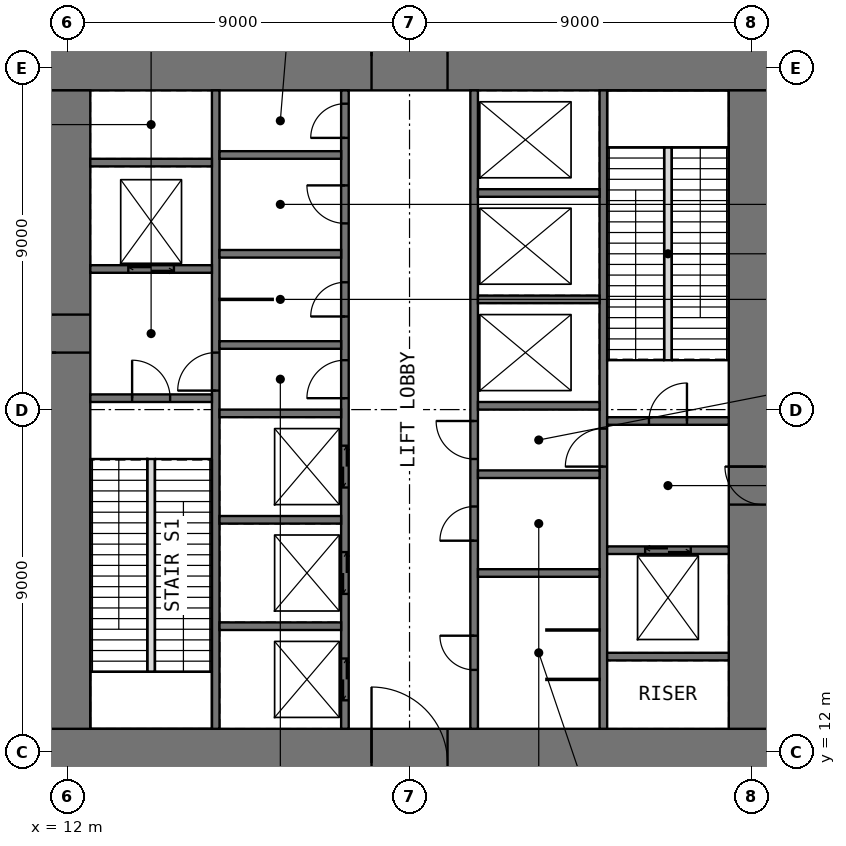
"""IFC4 building model, lengths in metres.
Left out: names, types, materials, properties, quantities, classifications, styles, units other than length and angle.
Written with IfcOpenShell. Run it as: python <this file> out.ifc"""

import sys

from ifc_helpers import new_model, si_unit, direction, frame, frame_2d, origin, place, context, subcontext, project, spatial, rectangle, extrude, element, fill, save


model = new_model("IFC4")
c1 = context("Model", 3, precision=1e-05, world=origin(), true_north=direction((0.0, 1.0)))
c2 = subcontext(c1, "Body", "Model", "MODEL_VIEW")
j1 = project(units=[si_unit("LENGTHUNIT", "METRE"), si_unit("PLANEANGLEUNIT", "RADIAN")], contexts=[c1])
p1 = place(None, origin())
s1 = spatial("IfcSite", under=j1, at=p1, CompositionType="ELEMENT")
p2 = place(p1, origin())
s2 = spatial("IfcBuilding", under=s1, at=p2, CompositionType="ELEMENT")
p3 = place(p2, frame((0.0, 0.0, 11.0)))
s3 = spatial("IfcBuildingStorey", under=s2, at=p3, CompositionType="ELEMENT", Elevation=11.0)
p4 = place(p3, frame((10.8, 11.7, -0.3), z_axis=(0.0, 0.0, 1.0), x_axis=(1.0, 0.0, 0.0)))
e1 = element("IfcWall", 1, at=p4, inside=s3, PredefinedType="SHEAR", context=c2, shape_type="SweptSolid", body=[
    extrude(rectangle(XDim=20.4, YDim=1.8, at=frame_2d((10.2, 0.0))), origin(), (0.0, 0.0, 1.0), 7.1),
])
p5 = place(p4, frame((9.2, 0.0, 0.3)))
e2 = element("IfcOpeningElement", 2, at=p5, cuts=e1, PredefinedType="OPENING", context=c2, shape_type="SweptSolid", body=[
    extrude(rectangle(XDim=2.0, YDim=2.2, at=frame_2d((1.0, 1.1))), frame((0.0, 0.91, 0.0), z_axis=(0.0, -1.0, 0.0), x_axis=(1.0, 0.0, 0.0)), (0.0, 0.0, 1.0), 1.82),
])
p6 = place(p3, frame((10.8, 30.3, -0.3), z_axis=(0.0, 0.0, 1.0), x_axis=(1.0, 0.0, 0.0)))
e3 = element("IfcWall", 3, at=p6, inside=s3, PredefinedType="SHEAR", context=c2, shape_type="SweptSolid", body=[
    extrude(rectangle(XDim=20.4, YDim=1.8, at=frame_2d((10.2, 0.0))), origin(), (0.0, 0.0, 1.0), 7.1),
])
p7 = place(p6, frame((9.2, 0.0, 0.3)))
e4 = element("IfcOpeningElement", 4, at=p7, cuts=e3, PredefinedType="OPENING", context=c2, shape_type="SweptSolid", body=[
    extrude(rectangle(XDim=2.0, YDim=2.2, at=frame_2d((1.0, 1.1))), frame((0.0, 0.91, 0.0), z_axis=(0.0, -1.0, 0.0), x_axis=(1.0, 0.0, 0.0)), (0.0, 0.0, 1.0), 1.82),
])
p8 = place(p3, frame((11.7, 12.6, -0.3), z_axis=(0.0, 0.0, 1.0), x_axis=(0.0, 1.0, 0.0)))
e5 = element("IfcWall", 5, at=p8, inside=s3, PredefinedType="SHEAR", context=c2, shape_type="SweptSolid", body=[
    extrude(rectangle(XDim=16.8, YDim=1.8, at=frame_2d((8.4, 0.0))), origin(), (0.0, 0.0, 1.0), 7.1),
])
p9 = place(p8, frame((9.9, 0.0, 0.3)))
e6 = element("IfcOpeningElement", 6, at=p9, cuts=e5, PredefinedType="OPENING", context=c2, shape_type="SweptSolid", body=[
    extrude(rectangle(XDim=1.0, YDim=2.2, at=frame_2d((0.5, 1.1))), frame((0.0, 0.91, 0.0), z_axis=(0.0, -1.0, 0.0), x_axis=(1.0, 0.0, 0.0)), (0.0, 0.0, 1.0), 1.82),
])
p10 = place(p3, frame((30.3, 12.6, -0.3), z_axis=(0.0, 0.0, 1.0), x_axis=(0.0, 1.0, 0.0)))
e7 = element("IfcWall", 7, at=p10, inside=s3, PredefinedType="SHEAR", context=c2, shape_type="SweptSolid", body=[
    extrude(rectangle(XDim=16.8, YDim=1.8, at=frame_2d((8.4, 0.0))), origin(), (0.0, 0.0, 1.0), 7.1),
])
p11 = place(p10, frame((5.9, 0.0, 0.3)))
e8 = element("IfcOpeningElement", 8, at=p11, cuts=e7, PredefinedType="OPENING", context=c2, shape_type="SweptSolid", body=[
    extrude(rectangle(XDim=1.0, YDim=2.2, at=frame_2d((0.5, 1.1))), frame((0.0, 0.91, 0.0), z_axis=(0.0, -1.0, 0.0), x_axis=(1.0, 0.0, 0.0)), (0.0, 0.0, 1.0), 1.82),
])
p12 = place(p3, frame((15.9, 12.6, -0.3), z_axis=(0.0, 0.0, 1.0), x_axis=(0.0, 1.0, 0.0)))
e9 = element("IfcWall", 9, at=p12, inside=s3, PredefinedType="SHEAR", context=c2, shape_type="SweptSolid", body=[
    extrude(rectangle(XDim=16.8, YDim=0.2, at=frame_2d((8.4, 0.0))), origin(), (0.0, 0.0, 1.0), 7.1),
])
p13 = place(p12, frame((8.9, 0.0, 0.3)))
e10 = element("IfcOpeningElement", 10, at=p13, cuts=e9, PredefinedType="OPENING", context=c2, shape_type="SweptSolid", body=[
    extrude(rectangle(XDim=1.0, YDim=2.2, at=frame_2d((0.5, 1.1))), frame((0.0, 0.11, 0.0), z_axis=(0.0, -1.0, 0.0), x_axis=(1.0, 0.0, 0.0)), (0.0, 0.0, 1.0), 0.22),
])
p14 = place(p3, frame((19.3, 12.6, -0.3), z_axis=(0.0, 0.0, 1.0), x_axis=(0.0, 1.0, 0.0)))
e11 = element("IfcWall", 11, at=p14, inside=s3, PredefinedType="SHEAR", context=c2, shape_type="SweptSolid", body=[
    extrude(rectangle(XDim=16.8, YDim=0.2, at=frame_2d((8.4, 0.0))), origin(), (0.0, 0.0, 1.0), 7.1),
])
p15 = place(p14, frame((8.7, 0.0, 0.3)))
e12 = element("IfcOpeningElement", 12, at=p15, cuts=e11, PredefinedType="OPENING", context=c2, shape_type="SweptSolid", body=[
    extrude(rectangle(XDim=1.0, YDim=2.2, at=frame_2d((0.5, 1.1))), frame((0.0, 0.11, 0.0), z_axis=(0.0, -1.0, 0.0), x_axis=(1.0, 0.0, 0.0)), (0.0, 0.0, 1.0), 0.22),
])
p16 = place(p14, frame((10.85, 0.0, 0.3)))
e13 = element("IfcOpeningElement", 13, at=p16, cuts=e11, PredefinedType="OPENING", context=c2, shape_type="SweptSolid", body=[
    extrude(rectangle(XDim=0.9, YDim=2.2, at=frame_2d((0.45, 1.1))), frame((0.0, 0.11, 0.0), z_axis=(0.0, -1.0, 0.0), x_axis=(1.0, 0.0, 0.0)), (0.0, 0.0, 1.0), 0.22),
])
p17 = place(p14, frame((13.3, 0.0, 0.3)))
e14 = element("IfcOpeningElement", 14, at=p17, cuts=e11, PredefinedType="OPENING", context=c2, shape_type="SweptSolid", body=[
    extrude(rectangle(XDim=1.0, YDim=2.2, at=frame_2d((0.5, 1.1))), frame((0.0, 0.11, 0.0), z_axis=(0.0, -1.0, 0.0), x_axis=(1.0, 0.0, 0.0)), (0.0, 0.0, 1.0), 0.22),
])
p18 = place(p14, frame((15.55, 0.0, 0.3)))
e15 = element("IfcOpeningElement", 15, at=p18, cuts=e11, PredefinedType="OPENING", context=c2, shape_type="SweptSolid", body=[
    extrude(rectangle(XDim=0.9, YDim=2.2, at=frame_2d((0.45, 1.1))), frame((0.0, 0.11, 0.0), z_axis=(0.0, -1.0, 0.0), x_axis=(1.0, 0.0, 0.0)), (0.0, 0.0, 1.0), 0.22),
])
p19 = place(p14, frame((0.75, 0.0, 0.3)))
e16 = element("IfcOpeningElement", 16, at=p19, cuts=e11, PredefinedType="OPENING", context=c2, shape_type="SweptSolid", body=[
    extrude(rectangle(XDim=1.1, YDim=2.2, at=frame_2d((0.55, 1.1))), frame((0.0, 0.11, 0.0), z_axis=(0.0, -1.0, 0.0), x_axis=(1.0, 0.0, 0.0)), (0.0, 0.0, 1.0), 0.22),
])
p20 = place(p14, frame((3.55, 0.0, 0.3)))
e17 = element("IfcOpeningElement", 17, at=p20, cuts=e11, PredefinedType="OPENING", context=c2, shape_type="SweptSolid", body=[
    extrude(rectangle(XDim=1.1, YDim=2.2, at=frame_2d((0.55, 1.1))), frame((0.0, 0.11, 0.0), z_axis=(0.0, -1.0, 0.0), x_axis=(1.0, 0.0, 0.0)), (0.0, 0.0, 1.0), 0.22),
])
p21 = place(p14, frame((6.35, 0.0, 0.3)))
e18 = element("IfcOpeningElement", 18, at=p21, cuts=e11, PredefinedType="OPENING", context=c2, shape_type="SweptSolid", body=[
    extrude(rectangle(XDim=1.1, YDim=2.2, at=frame_2d((0.55, 1.1))), frame((0.0, 0.11, 0.0), z_axis=(0.0, -1.0, 0.0), x_axis=(1.0, 0.0, 0.0)), (0.0, 0.0, 1.0), 0.22),
])
p22 = place(p3, frame((22.7, 12.6, -0.3), z_axis=(0.0, 0.0, 1.0), x_axis=(0.0, 1.0, 0.0)))
e19 = element("IfcWall", 19, at=p22, inside=s3, PredefinedType="SHEAR", context=c2, shape_type="SweptSolid", body=[
    extrude(rectangle(XDim=16.8, YDim=0.2, at=frame_2d((8.4, 0.0))), origin(), (0.0, 0.0, 1.0), 7.1),
])
p23 = place(p22, frame((7.1, 0.0, 0.3)))
e20 = element("IfcOpeningElement", 20, at=p23, cuts=e19, PredefinedType="OPENING", context=c2, shape_type="SweptSolid", body=[
    extrude(rectangle(XDim=1.0, YDim=2.2, at=frame_2d((0.5, 1.1))), frame((0.0, 0.11, 0.0), z_axis=(0.0, -1.0, 0.0), x_axis=(1.0, 0.0, 0.0)), (0.0, 0.0, 1.0), 0.22),
])
p24 = place(p22, frame((1.55, 0.0, 0.3)))
e21 = element("IfcOpeningElement", 21, at=p24, cuts=e19, PredefinedType="OPENING", context=c2, shape_type="SweptSolid", body=[
    extrude(rectangle(XDim=0.9, YDim=2.2, at=frame_2d((0.45, 1.1))), frame((0.0, 0.11, 0.0), z_axis=(0.0, -1.0, 0.0), x_axis=(1.0, 0.0, 0.0)), (0.0, 0.0, 1.0), 0.22),
])
p25 = place(p22, frame((4.95, 0.0, 0.3)))
e22 = element("IfcOpeningElement", 22, at=p25, cuts=e19, PredefinedType="OPENING", context=c2, shape_type="SweptSolid", body=[
    extrude(rectangle(XDim=0.9, YDim=2.2, at=frame_2d((0.45, 1.1))), frame((0.0, 0.11, 0.0), z_axis=(0.0, -1.0, 0.0), x_axis=(1.0, 0.0, 0.0)), (0.0, 0.0, 1.0), 0.22),
])
p26 = place(p3, frame((26.1, 12.6, -0.3), z_axis=(0.0, 0.0, 1.0), x_axis=(0.0, 1.0, 0.0)))
e23 = element("IfcWall", 23, at=p26, inside=s3, PredefinedType="SHEAR", context=c2, shape_type="SweptSolid", body=[
    extrude(rectangle(XDim=16.8, YDim=0.2, at=frame_2d((8.4, 0.0))), origin(), (0.0, 0.0, 1.0), 7.1),
])
p27 = place(p26, frame((6.9, 0.0, 0.3)))
e24 = element("IfcOpeningElement", 24, at=p27, cuts=e23, PredefinedType="OPENING", context=c2, shape_type="SweptSolid", body=[
    extrude(rectangle(XDim=1.0, YDim=2.2, at=frame_2d((0.5, 1.1))), frame((0.0, 0.11, 0.0), z_axis=(0.0, -1.0, 0.0), x_axis=(1.0, 0.0, 0.0)), (0.0, 0.0, 1.0), 0.22),
])
p28 = place(p3, frame((12.6, 21.3, -0.3), z_axis=(0.0, 0.0, 1.0), x_axis=(1.0, 0.0, 0.0)))
e25 = element("IfcWall", 25, at=p28, inside=s3, PredefinedType="SHEAR", context=c2, shape_type="SweptSolid", body=[
    extrude(rectangle(XDim=3.2, YDim=0.2, at=frame_2d((1.6, 0.0))), origin(), (0.0, 0.0, 1.0), 7.1),
])
p29 = place(p28, frame((1.1, 0.0, 0.3)))
e26 = element("IfcOpeningElement", 26, at=p29, cuts=e25, PredefinedType="OPENING", context=c2, shape_type="SweptSolid", body=[
    extrude(rectangle(XDim=1.0, YDim=2.2, at=frame_2d((0.5, 1.1))), frame((0.0, 0.11, 0.0), z_axis=(0.0, -1.0, 0.0), x_axis=(1.0, 0.0, 0.0)), (0.0, 0.0, 1.0), 0.22),
])
p30 = place(p3, frame((12.6, 24.7, -0.3), z_axis=(0.0, 0.0, 1.0), x_axis=(1.0, 0.0, 0.0)))
e27 = element("IfcWall", 27, at=p30, inside=s3, PredefinedType="SHEAR", context=c2, shape_type="SweptSolid", body=[
    extrude(rectangle(XDim=3.2, YDim=0.2, at=frame_2d((1.6, 0.0))), origin(), (0.0, 0.0, 1.0), 7.1),
])
p31 = place(p30, frame((1.0, 0.0, 0.3)))
e28 = element("IfcOpeningElement", 28, at=p31, cuts=e27, PredefinedType="OPENING", context=c2, shape_type="SweptSolid", body=[
    extrude(rectangle(XDim=1.2, YDim=2.2, at=frame_2d((0.6, 1.1))), frame((0.0, 0.11, 0.0), z_axis=(0.0, -1.0, 0.0), x_axis=(1.0, 0.0, 0.0)), (0.0, 0.0, 1.0), 0.22),
])
for number, where, z_axis, x_axis in (
    (29, (12.6, 27.5, -0.3), (0.0, 0.0, 1.0), (1.0, 0.0, 0.0)),
    (30, (16.0, 15.3, -0.3), (0.0, 0.0, 1.0), (1.0, 0.0, 0.0)),
    (31, (16.0, 18.1, -0.3), (0.0, 0.0, 1.0), (1.0, 0.0, 0.0)),
    (32, (16.0, 20.9, -0.3), (0.0, 0.0, 1.0), (1.0, 0.0, 0.0)),
    (33, (16.0, 22.7, -0.3), (0.0, 0.0, 1.0), (1.0, 0.0, 0.0)),
    (34, (16.0, 25.1, -0.3), (0.0, 0.0, 1.0), (1.0, 0.0, 0.0)),
    (35, (16.0, 27.7, -0.3), (0.0, 0.0, 1.0), (1.0, 0.0, 0.0)),
    (36, (22.8, 16.7, -0.3), (0.0, 0.0, 1.0), (1.0, 0.0, 0.0)),
    (37, (22.8, 19.3, -0.3), (0.0, 0.0, 1.0), (1.0, 0.0, 0.0)),
    (38, (22.8, 21.1, -0.3), (0.0, 0.0, 1.0), (1.0, 0.0, 0.0)),
    (39, (22.8, 23.9, -0.3), (0.0, 0.0, 1.0), (1.0, 0.0, 0.0)),
    (40, (22.8, 26.7, -0.3), (0.0, 0.0, 1.0), (1.0, 0.0, 0.0)),
    (41, (26.2, 14.5, -0.3), (0.0, 0.0, 1.0), (1.0, 0.0, 0.0)),
):
    element("IfcWall", number, at=place(p3, frame(where, z_axis=z_axis, x_axis=x_axis)), inside=s3, PredefinedType="SHEAR", context=c2, shape_type="SweptSolid", body=[
        extrude(rectangle(XDim=3.2, YDim=0.2, at=frame_2d((1.6, 0.0))), origin(), (0.0, 0.0, 1.0), 7.1),
    ])
p32 = place(p3, frame((26.2, 17.3, -0.3), z_axis=(0.0, 0.0, 1.0), x_axis=(1.0, 0.0, 0.0)))
e42 = element("IfcWall", 42, at=p32, inside=s3, PredefinedType="SHEAR", context=c2, shape_type="SweptSolid", body=[
    extrude(rectangle(XDim=3.2, YDim=0.2, at=frame_2d((1.6, 0.0))), origin(), (0.0, 0.0, 1.0), 7.1),
])
p33 = place(p32, frame((1.0, 0.0, 0.3)))
e43 = element("IfcOpeningElement", 43, at=p33, cuts=e42, PredefinedType="OPENING", context=c2, shape_type="SweptSolid", body=[
    extrude(rectangle(XDim=1.2, YDim=2.2, at=frame_2d((0.6, 1.1))), frame((0.0, 0.11, 0.0), z_axis=(0.0, -1.0, 0.0), x_axis=(1.0, 0.0, 0.0)), (0.0, 0.0, 1.0), 0.22),
])
p34 = place(p3, frame((26.2, 20.7, -0.3), z_axis=(0.0, 0.0, 1.0), x_axis=(1.0, 0.0, 0.0)))
e44 = element("IfcWall", 44, at=p34, inside=s3, PredefinedType="SHEAR", context=c2, shape_type="SweptSolid", body=[
    extrude(rectangle(XDim=3.2, YDim=0.2, at=frame_2d((1.6, 0.0))), origin(), (0.0, 0.0, 1.0), 7.1),
])
p35 = place(p34, frame((1.1, 0.0, 0.3)))
e45 = element("IfcOpeningElement", 45, at=p35, cuts=e44, PredefinedType="OPENING", context=c2, shape_type="SweptSolid", body=[
    extrude(rectangle(XDim=1.0, YDim=2.2, at=frame_2d((0.5, 1.1))), frame((0.0, 0.11, 0.0), z_axis=(0.0, -1.0, 0.0), x_axis=(1.0, 0.0, 0.0)), (0.0, 0.0, 1.0), 0.22),
])
for number, where, z_axis, x_axis in (
    (46, (24.6, 13.9, 0.0), (0.0, 0.0, 1.0), (1.0, 0.0, 0.0)),
    (47, (24.6, 15.2, 0.0), (0.0, 0.0, 1.0), (1.0, 0.0, 0.0)),
    (48, (16.0, 23.9, 0.0), (0.0, 0.0, 1.0), (1.0, 0.0, 0.0)),
):
    element("IfcWall", number, at=place(p3, frame(where, z_axis=z_axis, x_axis=x_axis)), inside=s3, PredefinedType="PARTITIONING", context=c2, shape_type="SweptSolid", body=[
        extrude(rectangle(XDim=1.4, YDim=0.03, at=frame_2d((0.7, 0.0))), origin(), (0.0, 0.0, 1.0), 6.6),
    ])
for number, where, z_axis, x_axis in (
    (49, (14.2, 14.1, 0.0), (0.0, 0.0, 1.0), (0.0, 1.0, 0.0)),
    (50, (27.8, 22.3, 0.0), (0.0, 0.0, 1.0), (0.0, 1.0, 0.0)),
):
    element("IfcWall", number, at=place(p3, frame(where, z_axis=z_axis, x_axis=x_axis)), inside=s3, PredefinedType="PARTITIONING", context=c2, shape_type="SweptSolid", body=[
        extrude(rectangle(XDim=5.6, YDim=0.2, at=frame_2d((2.8, 0.0))), origin(), (0.0, 0.0, 1.0), 7.0),
    ])
p36 = place(p5, origin())
e51 = element("IfcDoor", 51, at=p36, inside=s3, OperationType="DOUBLE_DOOR_SINGLE_SWING", PredefinedType="DOOR", context=c2, shape_type="SweptSolid", body=[
    extrude(rectangle(XDim=2.0, YDim=2.2, at=frame_2d((1.0, 1.1))), frame((0.0, 0.025, 0.0), z_axis=(0.0, -1.0, 0.0), x_axis=(1.0, 0.0, 0.0)), (0.0, 0.0, 1.0), 0.05),
])
fill(e2, e51)
p37 = place(p7, origin())
e52 = element("IfcDoor", 52, at=p37, inside=s3, OperationType="DOUBLE_DOOR_SINGLE_SWING", PredefinedType="DOOR", context=c2, shape_type="SweptSolid", body=[
    extrude(rectangle(XDim=2.0, YDim=2.2, at=frame_2d((1.0, 1.1))), frame((0.0, 0.025, 0.0), z_axis=(0.0, -1.0, 0.0), x_axis=(1.0, 0.0, 0.0)), (0.0, 0.0, 1.0), 0.05),
])
fill(e4, e52)
p38 = place(p9, origin())
e53 = element("IfcDoor", 53, at=p38, inside=s3, OperationType="SINGLE_SWING_LEFT", PredefinedType="DOOR", context=c2, shape_type="SweptSolid", body=[
    extrude(rectangle(XDim=1.0, YDim=2.2, at=frame_2d((0.5, 1.1))), frame((0.0, 0.025, 0.0), z_axis=(0.0, -1.0, 0.0), x_axis=(1.0, 0.0, 0.0)), (0.0, 0.0, 1.0), 0.05),
])
fill(e6, e53)
p39 = place(p11, origin())
e54 = element("IfcDoor", 54, at=p39, inside=s3, OperationType="SINGLE_SWING_RIGHT", PredefinedType="DOOR", context=c2, shape_type="SweptSolid", body=[
    extrude(rectangle(XDim=1.0, YDim=2.2, at=frame_2d((0.5, 1.1))), frame((0.0, 0.025, 0.0), z_axis=(0.0, -1.0, 0.0), x_axis=(1.0, 0.0, 0.0)), (0.0, 0.0, 1.0), 0.05),
])
fill(e8, e54)
p40 = place(p29, origin())
e55 = element("IfcDoor", 55, at=p40, inside=s3, OperationType="SINGLE_SWING_LEFT", PredefinedType="DOOR", context=c2, shape_type="SweptSolid", body=[
    extrude(rectangle(XDim=1.0, YDim=2.2, at=frame_2d((0.5, 1.1))), frame((0.0, 0.025, 0.0), z_axis=(0.0, -1.0, 0.0), x_axis=(1.0, 0.0, 0.0)), (0.0, 0.0, 1.0), 0.05),
])
fill(e26, e55)
p41 = place(p35, origin())
e56 = element("IfcDoor", 56, at=p41, inside=s3, OperationType="SINGLE_SWING_RIGHT", PredefinedType="DOOR", context=c2, shape_type="SweptSolid", body=[
    extrude(rectangle(XDim=1.0, YDim=2.2, at=frame_2d((0.5, 1.1))), frame((0.0, 0.025, 0.0), z_axis=(0.0, -1.0, 0.0), x_axis=(1.0, 0.0, 0.0)), (0.0, 0.0, 1.0), 0.05),
])
fill(e45, e56)
p42 = place(p13, origin())
e57 = element("IfcDoor", 57, at=p42, inside=s3, OperationType="SINGLE_SWING_LEFT", PredefinedType="DOOR", context=c2, shape_type="SweptSolid", body=[
    extrude(rectangle(XDim=1.0, YDim=2.2, at=frame_2d((0.5, 1.1))), frame((0.0, 0.025, 0.0), z_axis=(0.0, -1.0, 0.0), x_axis=(1.0, 0.0, 0.0)), (0.0, 0.0, 1.0), 0.05),
])
fill(e10, e57)
p43 = place(p27, origin())
e58 = element("IfcDoor", 58, at=p43, inside=s3, OperationType="SINGLE_SWING_LEFT", PredefinedType="DOOR", context=c2, shape_type="SweptSolid", body=[
    extrude(rectangle(XDim=1.0, YDim=2.2, at=frame_2d((0.5, 1.1))), frame((0.0, 0.025, 0.0), z_axis=(0.0, -1.0, 0.0), x_axis=(1.0, 0.0, 0.0)), (0.0, 0.0, 1.0), 0.05),
])
fill(e24, e58)
p44 = place(p15, origin())
e59 = element("IfcDoor", 59, at=p44, inside=s3, OperationType="SINGLE_SWING_LEFT", PredefinedType="DOOR", context=c2, shape_type="SweptSolid", body=[
    extrude(rectangle(XDim=1.0, YDim=2.2, at=frame_2d((0.5, 1.1))), frame((0.0, 0.025, 0.0), z_axis=(0.0, -1.0, 0.0), x_axis=(1.0, 0.0, 0.0)), (0.0, 0.0, 1.0), 0.05),
])
fill(e12, e59)
p45 = place(p23, origin())
e60 = element("IfcDoor", 60, at=p45, inside=s3, OperationType="SINGLE_SWING_RIGHT", PredefinedType="DOOR", context=c2, shape_type="SweptSolid", body=[
    extrude(rectangle(XDim=1.0, YDim=2.2, at=frame_2d((0.5, 1.1))), frame((0.0, 0.025, 0.0), z_axis=(0.0, -1.0, 0.0), x_axis=(1.0, 0.0, 0.0)), (0.0, 0.0, 1.0), 0.05),
])
fill(e20, e60)
p46 = place(p16, origin())
e61 = element("IfcDoor", 61, at=p46, inside=s3, OperationType="SINGLE_SWING_LEFT", PredefinedType="DOOR", context=c2, shape_type="SweptSolid", body=[
    extrude(rectangle(XDim=0.9, YDim=2.2, at=frame_2d((0.45, 1.1))), frame((0.0, 0.025, 0.0), z_axis=(0.0, -1.0, 0.0), x_axis=(1.0, 0.0, 0.0)), (0.0, 0.0, 1.0), 0.05),
])
fill(e13, e61)
p47 = place(p17, origin())
e62 = element("IfcDoor", 62, at=p47, inside=s3, OperationType="SINGLE_SWING_RIGHT", PredefinedType="DOOR", context=c2, shape_type="SweptSolid", body=[
    extrude(rectangle(XDim=1.0, YDim=2.2, at=frame_2d((0.5, 1.1))), frame((0.0, 0.025, 0.0), z_axis=(0.0, -1.0, 0.0), x_axis=(1.0, 0.0, 0.0)), (0.0, 0.0, 1.0), 0.05),
])
fill(e14, e62)
p48 = place(p18, origin())
e63 = element("IfcDoor", 63, at=p48, inside=s3, OperationType="SINGLE_SWING_LEFT", PredefinedType="DOOR", context=c2, shape_type="SweptSolid", body=[
    extrude(rectangle(XDim=0.9, YDim=2.2, at=frame_2d((0.45, 1.1))), frame((0.0, 0.025, 0.0), z_axis=(0.0, -1.0, 0.0), x_axis=(1.0, 0.0, 0.0)), (0.0, 0.0, 1.0), 0.05),
])
fill(e15, e63)
p49 = place(p24, origin())
e64 = element("IfcDoor", 64, at=p49, inside=s3, OperationType="SINGLE_SWING_RIGHT", PredefinedType="DOOR", context=c2, shape_type="SweptSolid", body=[
    extrude(rectangle(XDim=0.9, YDim=2.2, at=frame_2d((0.45, 1.1))), frame((0.0, 0.025, 0.0), z_axis=(0.0, -1.0, 0.0), x_axis=(1.0, 0.0, 0.0)), (0.0, 0.0, 1.0), 0.05),
])
fill(e21, e64)
p50 = place(p25, origin())
e65 = element("IfcDoor", 65, at=p50, inside=s3, OperationType="SINGLE_SWING_LEFT", PredefinedType="DOOR", context=c2, shape_type="SweptSolid", body=[
    extrude(rectangle(XDim=0.9, YDim=2.2, at=frame_2d((0.45, 1.1))), frame((0.0, 0.025, 0.0), z_axis=(0.0, -1.0, 0.0), x_axis=(1.0, 0.0, 0.0)), (0.0, 0.0, 1.0), 0.05),
])
fill(e22, e65)
p51 = place(p19, origin())
e66 = element("IfcDoor", 66, at=p51, inside=s3, OperationType="DOUBLE_DOOR_SLIDING", PredefinedType="DOOR", context=c2, shape_type="SweptSolid", body=[
    extrude(rectangle(XDim=1.1, YDim=2.2, at=frame_2d((0.55, 1.1))), frame((0.0, 0.025, 0.0), z_axis=(0.0, -1.0, 0.0), x_axis=(1.0, 0.0, 0.0)), (0.0, 0.0, 1.0), 0.05),
])
fill(e16, e66)
p52 = place(p20, origin())
e67 = element("IfcDoor", 67, at=p52, inside=s3, OperationType="DOUBLE_DOOR_SLIDING", PredefinedType="DOOR", context=c2, shape_type="SweptSolid", body=[
    extrude(rectangle(XDim=1.1, YDim=2.2, at=frame_2d((0.55, 1.1))), frame((0.0, 0.025, 0.0), z_axis=(0.0, -1.0, 0.0), x_axis=(1.0, 0.0, 0.0)), (0.0, 0.0, 1.0), 0.05),
])
fill(e17, e67)
p53 = place(p21, origin())
e68 = element("IfcDoor", 68, at=p53, inside=s3, OperationType="DOUBLE_DOOR_SLIDING", PredefinedType="DOOR", context=c2, shape_type="SweptSolid", body=[
    extrude(rectangle(XDim=1.1, YDim=2.2, at=frame_2d((0.55, 1.1))), frame((0.0, 0.025, 0.0), z_axis=(0.0, -1.0, 0.0), x_axis=(1.0, 0.0, 0.0)), (0.0, 0.0, 1.0), 0.05),
])
fill(e18, e68)
p54 = place(p31, origin())
e69 = element("IfcDoor", 69, at=p54, inside=s3, OperationType="DOUBLE_DOOR_SLIDING", PredefinedType="DOOR", context=c2, shape_type="SweptSolid", body=[
    extrude(rectangle(XDim=1.2, YDim=2.2, at=frame_2d((0.6, 1.1))), frame((0.0, 0.025, 0.0), z_axis=(0.0, -1.0, 0.0), x_axis=(1.0, 0.0, 0.0)), (0.0, 0.0, 1.0), 0.05),
])
fill(e28, e69)
p55 = place(p33, origin())
e70 = element("IfcDoor", 70, at=p55, inside=s3, OperationType="DOUBLE_DOOR_SLIDING", PredefinedType="DOOR", context=c2, shape_type="SweptSolid", body=[
    extrude(rectangle(XDim=1.2, YDim=2.2, at=frame_2d((0.6, 1.1))), frame((0.0, 0.025, 0.0), z_axis=(0.0, -1.0, 0.0), x_axis=(1.0, 0.0, 0.0)), (0.0, 0.0, 1.0), 0.05),
])
fill(e43, e70)
save(model, sys.argv[1])
